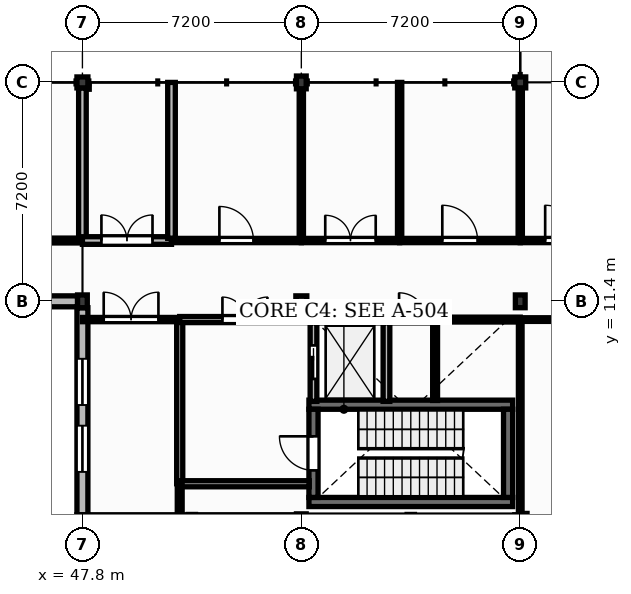
"""IFC4 building model, lengths in metres.
Left out: names, types, materials, properties, quantities, classifications, styles, units other than length and angle.
Written with IfcOpenShell. Run it as: python <this file> out.ifc"""

import sys

from ifc_helpers import new_model, si_unit, direction, frame, frame_2d, origin, origin_2d, place, context, subcontext, project, spatial, rectangle, extrude, element, fill, save


model = new_model("IFC4")
c1 = context("Model", 3, precision=1e-05, world=origin(), true_north=direction((0.0, 1.0)))
c2 = subcontext(c1, "Body", "Model", "MODEL_VIEW")
j1 = project(units=[si_unit("LENGTHUNIT", "METRE"), si_unit("PLANEANGLEUNIT", "RADIAN")], contexts=[c1])
p1 = place(None, origin())
s1 = spatial("IfcSite", under=j1, at=p1, CompositionType="ELEMENT")
p2 = place(p1, origin())
s2 = spatial("IfcBuilding", under=s1, at=p2, CompositionType="ELEMENT")
p3 = place(p2, frame((0.0, 0.0, 4.5)))
s3 = spatial("IfcBuildingStorey", under=s2, at=p3, CompositionType="ELEMENT", Elevation=4.5)
p4 = place(p3, frame((47.8, 11.4, 0.0), z_axis=(0.0, 0.0, 1.0), x_axis=(1.0, 0.0, 0.0)))
e1 = element("IfcColumn", 1, at=p4, inside=s3, PredefinedType="COLUMN", context=c2, shape_type="SweptSolid", body=[
    extrude(rectangle(XDim=0.32, YDim=0.42, at=origin_2d()), origin(), (0.0, 0.0, 1.0), 4.26),
])
p5 = place(p3, frame((47.8, 18.6, 0.0), z_axis=(0.0, 0.0, 1.0), x_axis=(1.0, 0.0, 0.0)))
e2 = element("IfcColumn", 2, at=p5, inside=s3, PredefinedType="COLUMN", context=c2, shape_type="SweptSolid", body=[
    extrude(rectangle(XDim=0.36, YDim=0.36, at=origin_2d()), origin(), (0.0, 0.0, 1.0), 4.26),
])
p6 = place(p3, frame((55.0, 4.2, 0.0), z_axis=(0.0, 0.0, 1.0), x_axis=(1.0, 0.0, 0.0)))
e3 = element("IfcColumn", 3, at=p6, inside=s3, PredefinedType="COLUMN", context=c2, shape_type="SweptSolid", body=[
    extrude(rectangle(XDim=0.32, YDim=0.42, at=origin_2d()), origin(), (0.0, 0.0, 1.0), 4.26),
])
p7 = place(p3, frame((55.0, 11.4, 0.0), z_axis=(0.0, 0.0, 1.0), x_axis=(1.0, 0.0, 0.0)))
e4 = element("IfcColumn", 4, at=p7, inside=s3, PredefinedType="COLUMN", context=c2, shape_type="SweptSolid", body=[
    extrude(rectangle(XDim=0.36, YDim=0.36, at=origin_2d()), origin(), (0.0, 0.0, 1.0), 4.26),
])
for number, where, z_axis, x_axis in (
    (5, (55.0, 18.6, 0.0), (0.0, 0.0, 1.0), (1.0, 0.0, 0.0)),
    (6, (62.2, 11.4, 0.0), (0.0, 0.0, 1.0), (1.0, 0.0, 0.0)),
):
    element("IfcColumn", number, at=place(p3, frame(where, z_axis=z_axis, x_axis=x_axis)), inside=s3, PredefinedType="COLUMN", context=c2, shape_type="SweptSolid", body=[
        extrude(rectangle(XDim=0.32, YDim=0.42, at=origin_2d()), origin(), (0.0, 0.0, 1.0), 4.26),
    ])
p8 = place(p3, frame((62.2, 18.6, 0.0), z_axis=(0.0, 0.0, 1.0), x_axis=(1.0, 0.0, 0.0)))
e7 = element("IfcColumn", 7, at=p8, inside=s3, PredefinedType="COLUMN", context=c2, shape_type="SweptSolid", body=[
    extrude(rectangle(XDim=0.36, YDim=0.36, at=origin_2d()), origin(), (0.0, 0.0, 1.0), 4.26),
])
p9 = place(p3, frame((40.78, 11.4, 0.0), z_axis=(0.0, 0.0, 1.0), x_axis=(1.0, 0.0, 0.0)))
e8 = element("IfcWall", 8, at=p9, inside=s3, PredefinedType="SOLIDWALL", context=c2, shape_type="SweptSolid", body=[
    extrude(rectangle(XDim=6.86, YDim=0.36, at=frame_2d((3.43, 0.0))), origin(), (0.0, 0.0, 1.0), 3.8),
])
p10 = place(p9, frame((1.33, 0.0, 1.0)))
e9 = element("IfcOpeningElement", 9, at=p10, cuts=e8, PredefinedType="OPENING", context=c2, shape_type="SweptSolid", body=[
    extrude(rectangle(XDim=1.76, YDim=1.95, at=frame_2d((0.88, 0.975))), frame((0.0, 0.19, 0.0), z_axis=(0.0, -1.0, 0.0), x_axis=(1.0, 0.0, 0.0)), (0.0, 0.0, 1.0), 0.38),
])
p11 = place(p9, frame((3.77, 0.0, 1.0)))
e10 = element("IfcOpeningElement", 10, at=p11, cuts=e8, PredefinedType="OPENING", context=c2, shape_type="SweptSolid", body=[
    extrude(rectangle(XDim=1.76, YDim=1.95, at=frame_2d((0.88, 0.975))), frame((0.0, 0.19, 0.0), z_axis=(0.0, -1.0, 0.0), x_axis=(1.0, 0.0, 0.0)), (0.0, 0.0, 1.0), 0.38),
])
p12 = place(p3, frame((47.8, 4.38, 0.0), z_axis=(0.0, 0.0, 1.0), x_axis=(0.0, 1.0, 0.0)))
e11 = element("IfcWall", 11, at=p12, inside=s3, PredefinedType="SOLIDWALL", context=c2, shape_type="SweptSolid", body=[
    extrude(rectangle(XDim=6.81, YDim=0.36, at=frame_2d((3.405, 0.0))), origin(), (0.0, 0.0, 1.0), 3.8),
])
p13 = place(p12, frame((1.41, 0.0, 1.0)))
e12 = element("IfcOpeningElement", 12, at=p13, cuts=e11, PredefinedType="OPENING", context=c2, shape_type="SweptSolid", body=[
    extrude(rectangle(XDim=1.52, YDim=1.8, at=frame_2d((0.76, 0.9))), frame((0.0, 0.19, 0.0), z_axis=(0.0, -1.0, 0.0), x_axis=(1.0, 0.0, 0.0)), (0.0, 0.0, 1.0), 0.38),
])
p14 = place(p12, frame((3.61, 0.0, 1.0)))
e13 = element("IfcOpeningElement", 13, at=p14, cuts=e11, PredefinedType="OPENING", context=c2, shape_type="SweptSolid", body=[
    extrude(rectangle(XDim=1.52, YDim=1.8, at=frame_2d((0.76, 0.9))), frame((0.0, 0.19, 0.0), z_axis=(0.0, -1.0, 0.0), x_axis=(1.0, 0.0, 0.0)), (0.0, 0.0, 1.0), 0.38),
])
for number, where, z_axis, x_axis in (
    (14, (55.25, 4.8, 0.0), (0.0, 0.0, 1.0), (1.0, 0.0, 0.0)),
    (15, (55.25, 8.0, 0.0), (0.0, 0.0, 1.0), (1.0, 0.0, 0.0)),
):
    element("IfcWall", number, at=place(p3, frame(where, z_axis=z_axis, x_axis=x_axis)), inside=s3, PredefinedType="SHEAR", context=c2, shape_type="SweptSolid", body=[
        extrude(rectangle(XDim=6.7, YDim=0.3, at=frame_2d((3.35, 0.0))), origin(), (0.0, 0.0, 1.0), 4.25),
    ])
p15 = place(p3, frame((55.4, 4.95, 0.0), z_axis=(0.0, 0.0, 1.0), x_axis=(0.0, 1.0, 0.0)))
e16 = element("IfcWall", 16, at=p15, inside=s3, PredefinedType="SHEAR", context=c2, shape_type="SweptSolid", body=[
    extrude(rectangle(XDim=2.9, YDim=0.3, at=frame_2d((1.45, 0.0))), origin(), (0.0, 0.0, 1.0), 4.25),
])
p16 = place(p15, frame((0.89, 0.0, 0.0)))
e17 = element("IfcOpeningElement", 17, at=p16, cuts=e16, PredefinedType="OPENING", context=c2, shape_type="SweptSolid", body=[
    extrude(rectangle(XDim=1.12, YDim=2.1, at=frame_2d((0.56, 1.05))), frame((0.0, 0.16, 0.0), z_axis=(0.0, -1.0, 0.0), x_axis=(1.0, 0.0, 0.0)), (0.0, 0.0, 1.0), 0.32),
])
p17 = place(p3, frame((61.8, 4.95, 0.0), z_axis=(0.0, 0.0, 1.0), x_axis=(0.0, 1.0, 0.0)))
e18 = element("IfcWall", 18, at=p17, inside=s3, PredefinedType="SHEAR", context=c2, shape_type="SweptSolid", body=[
    extrude(rectangle(XDim=2.9, YDim=0.3, at=frame_2d((1.45, 0.0))), origin(), (0.0, 0.0, 1.0), 4.25),
])
p18 = place(p3, frame((55.4, 10.8, 0.0), z_axis=(0.0, 0.0, 1.0), x_axis=(1.0, 0.0, 0.0)))
e19 = element("IfcWall", 19, at=p18, inside=s3, PredefinedType="SOLIDWALL", context=c2, shape_type="SweptSolid", body=[
    extrude(rectangle(XDim=2.4, YDim=0.22, at=frame_2d((1.2, 0.0))), origin(), (0.0, 0.0, 1.0), 4.25),
])
p19 = place(p3, frame((55.4, 8.11, 0.0), z_axis=(0.0, 0.0, 1.0), x_axis=(0.0, 1.0, 0.0)))
e20 = element("IfcWall", 20, at=p19, inside=s3, PredefinedType="SOLIDWALL", context=c2, shape_type="SweptSolid", body=[
    extrude(rectangle(XDim=2.58, YDim=0.22, at=frame_2d((1.29, 0.0))), origin(), (0.0, 0.0, 1.0), 4.25),
])
p20 = place(p19, frame((0.74, 0.0, 0.0)))
e21 = element("IfcOpeningElement", 21, at=p20, cuts=e20, PredefinedType="OPENING", context=c2, shape_type="SweptSolid", body=[
    extrude(rectangle(XDim=1.1, YDim=2.15, at=frame_2d((0.55, 1.075))), frame((0.0, 0.12, 0.0), z_axis=(0.0, -1.0, 0.0), x_axis=(1.0, 0.0, 0.0)), (0.0, 0.0, 1.0), 0.24),
])
p21 = place(p3, frame((57.8, 8.11, 0.0), z_axis=(0.0, 0.0, 1.0), x_axis=(0.0, 1.0, 0.0)))
e22 = element("IfcWall", 22, at=p21, inside=s3, PredefinedType="SOLIDWALL", context=c2, shape_type="SweptSolid", body=[
    extrude(rectangle(XDim=2.58, YDim=0.22, at=frame_2d((1.29, 0.0))), origin(), (0.0, 0.0, 1.0), 4.25),
])
p22 = place(p3, frame((40.6, 13.4, 0.0), z_axis=(0.0, 0.0, 1.0), x_axis=(1.0, 0.0, 0.0)))
e23 = element("IfcWall", 23, at=p22, inside=s3, PredefinedType="PARTITIONING", context=c2, shape_type="SweptSolid", body=[
    extrude(rectangle(XDim=7.2, YDim=0.16, at=frame_2d((3.6, 0.0))), origin(), (0.0, 0.0, 1.0), 4.18),
])
p23 = place(p22, frame((2.68, 0.0, 0.0)))
e24 = element("IfcOpeningElement", 24, at=p23, cuts=e23, PredefinedType="OPENING", context=c2, shape_type="SweptSolid", body=[
    extrude(rectangle(XDim=1.84, YDim=2.35, at=frame_2d((0.92, 1.175))), frame((0.0, 0.09, 0.0), z_axis=(0.0, -1.0, 0.0), x_axis=(1.0, 0.0, 0.0)), (0.0, 0.0, 1.0), 0.18),
])
p24 = place(p3, frame((47.8, 10.8, 0.0), z_axis=(0.0, 0.0, 1.0), x_axis=(1.0, 0.0, 0.0)))
e25 = element("IfcWall", 25, at=p24, inside=s3, PredefinedType="PARTITIONING", context=c2, shape_type="SweptSolid", body=[
    extrude(rectangle(XDim=3.2, YDim=0.14, at=frame_2d((1.6, 0.0))), origin(), (0.0, 0.0, 1.0), 4.18),
])
p25 = place(p24, frame((0.7, 0.0, 0.0)))
e26 = element("IfcOpeningElement", 26, at=p25, cuts=e25, PredefinedType="OPENING", context=c2, shape_type="SweptSolid", body=[
    extrude(rectangle(XDim=1.8, YDim=2.3, at=frame_2d((0.9, 1.15))), frame((0.0, 0.08, 0.0), z_axis=(0.0, -1.0, 0.0), x_axis=(1.0, 0.0, 0.0)), (0.0, 0.0, 1.0), 0.16),
])
p26 = place(p3, frame((47.8, 13.47, 0.0), z_axis=(0.0, 0.0, 1.0), x_axis=(0.0, 1.0, 0.0)))
e27 = element("IfcWall", 27, at=p26, inside=s3, PredefinedType="SOLIDWALL", context=c2, shape_type="SweptSolid", body=[
    extrude(rectangle(XDim=4.95, YDim=0.25, at=frame_2d((2.475, 0.0))), origin(), (0.0, 0.0, 1.0), 3.74),
])
p27 = place(p3, frame((47.8, 13.4, 0.0), z_axis=(0.0, 0.0, 1.0), x_axis=(1.0, 0.0, 0.0)))
e28 = element("IfcWall", 28, at=p27, inside=s3, PredefinedType="SOLIDWALL", context=c2, shape_type="SweptSolid", body=[
    extrude(rectangle(XDim=2.93, YDim=0.25, at=frame_2d((1.465, 0.0))), origin(), (0.0, 0.0, 1.0), 4.18),
])
p28 = place(p27, frame((0.625, 0.0, 0.0)))
e29 = element("IfcOpeningElement", 29, at=p28, cuts=e28, PredefinedType="OPENING", context=c2, shape_type="SweptSolid", body=[
    extrude(rectangle(XDim=1.68, YDim=2.3, at=frame_2d((0.84, 1.15))), frame((0.0, 0.135, 0.0), z_axis=(0.0, -1.0, 0.0), x_axis=(1.0, 0.0, 0.0)), (0.0, 0.0, 1.0), 0.27),
])
p29 = place(p3, frame((50.73, 13.47, 0.0), z_axis=(0.0, 0.0, 1.0), x_axis=(0.0, 1.0, 0.0)))
e30 = element("IfcWall", 30, at=p29, inside=s3, PredefinedType="SOLIDWALL", context=c2, shape_type="SweptSolid", body=[
    extrude(rectangle(XDim=5.13, YDim=0.25, at=frame_2d((2.565, 0.0))), origin(), (0.0, 0.0, 1.0), 4.18),
])
p30 = place(p3, frame((50.73, 13.4, 0.0), z_axis=(0.0, 0.0, 1.0), x_axis=(1.0, 0.0, 0.0)))
e31 = element("IfcWall", 31, at=p30, inside=s3, PredefinedType="PARTITIONING", context=c2, shape_type="SweptSolid", body=[
    extrude(rectangle(XDim=4.27, YDim=0.14, at=frame_2d((2.135, 0.0))), origin(), (0.0, 0.0, 1.0), 4.18),
])
p31 = place(p30, frame((1.575, 0.0, 0.0)))
e32 = element("IfcOpeningElement", 32, at=p31, cuts=e31, PredefinedType="OPENING", context=c2, shape_type="SweptSolid", body=[
    extrude(rectangle(XDim=1.12, YDim=2.15, at=frame_2d((0.56, 1.075))), frame((0.0, 0.08, 0.0), z_axis=(0.0, -1.0, 0.0), x_axis=(1.0, 0.0, 0.0)), (0.0, 0.0, 1.0), 0.16),
])
p32 = place(p3, frame((51.0, 5.4, 0.0), z_axis=(0.0, 0.0, 1.0), x_axis=(0.0, 1.0, 0.0)))
e33 = element("IfcWall", 33, at=p32, inside=s3, PredefinedType="PARTITIONING", context=c2, shape_type="SweptSolid", body=[
    extrude(rectangle(XDim=5.33, YDim=0.2, at=frame_2d((2.665, 0.0))), origin(), (0.0, 0.0, 1.0), 4.18),
])
p33 = place(p3, frame((51.0, 10.8, 0.0), z_axis=(0.0, 0.0, 1.0), x_axis=(1.0, 0.0, 0.0)))
e34 = element("IfcWall", 34, at=p33, inside=s3, PredefinedType="PARTITIONING", context=c2, shape_type="SweptSolid", body=[
    extrude(rectangle(XDim=4.29, YDim=0.2, at=frame_2d((2.145, 0.0))), origin(), (0.0, 0.0, 1.0), 4.18),
])
p34 = place(p33, frame((1.405, 0.0, 0.0)))
e35 = element("IfcOpeningElement", 35, at=p34, cuts=e34, PredefinedType="OPENING", context=c2, shape_type="SweptSolid", body=[
    extrude(rectangle(XDim=1.48, YDim=2.25, at=frame_2d((0.74, 1.125))), frame((0.0, 0.11, 0.0), z_axis=(0.0, -1.0, 0.0), x_axis=(1.0, 0.0, 0.0)), (0.0, 0.0, 1.0), 0.22),
])
p35 = place(p3, frame((55.0, 13.47, 0.0), z_axis=(0.0, 0.0, 1.0), x_axis=(0.0, 1.0, 0.0)))
e36 = element("IfcWall", 36, at=p35, inside=s3, PredefinedType="PARTITIONING", context=c2, shape_type="SweptSolid", body=[
    extrude(rectangle(XDim=4.92, YDim=0.14, at=frame_2d((2.46, 0.0))), origin(), (0.0, 0.0, 1.0), 3.74),
])
p36 = place(p3, frame((55.0, 13.4, 0.0), z_axis=(0.0, 0.0, 1.0), x_axis=(1.0, 0.0, 0.0)))
e37 = element("IfcWall", 37, at=p36, inside=s3, PredefinedType="PARTITIONING", context=c2, shape_type="SweptSolid", body=[
    extrude(rectangle(XDim=3.233, YDim=0.14, at=frame_2d((1.616, 0.0))), origin(), (0.0, 0.0, 1.0), 4.18),
])
p37 = place(p36, frame((0.787, 0.0, 0.0)))
e38 = element("IfcOpeningElement", 38, at=p37, cuts=e37, PredefinedType="OPENING", context=c2, shape_type="SweptSolid", body=[
    extrude(rectangle(XDim=1.66, YDim=2.3, at=frame_2d((0.83, 1.15))), frame((0.0, 0.08, 0.0), z_axis=(0.0, -1.0, 0.0), x_axis=(1.0, 0.0, 0.0)), (0.0, 0.0, 1.0), 0.16),
])
p38 = place(p3, frame((57.91, 10.8, 0.0), z_axis=(0.0, 0.0, 1.0), x_axis=(1.0, 0.0, 0.0)))
e39 = element("IfcWall", 39, at=p38, inside=s3, PredefinedType="SOLIDWALL", context=c2, shape_type="SweptSolid", body=[
    extrude(rectangle(XDim=1.49, YDim=0.22, at=frame_2d((0.745, 0.0))), origin(), (0.0, 0.0, 1.0), 4.18),
])
p39 = place(p38, frame((0.305, 0.0, 0.0)))
e40 = element("IfcOpeningElement", 40, at=p39, cuts=e39, PredefinedType="OPENING", context=c2, shape_type="SweptSolid", body=[
    extrude(rectangle(XDim=0.88, YDim=2.05, at=frame_2d((0.44, 1.025))), frame((0.0, 0.12, 0.0), z_axis=(0.0, -1.0, 0.0), x_axis=(1.0, 0.0, 0.0)), (0.0, 0.0, 1.0), 0.24),
])
p40 = place(p3, frame((58.233, 13.47, 0.0), z_axis=(0.0, 0.0, 1.0), x_axis=(0.0, 1.0, 0.0)))
e41 = element("IfcWall", 41, at=p40, inside=s3, PredefinedType="PARTITIONING", context=c2, shape_type="SweptSolid", body=[
    extrude(rectangle(XDim=5.13, YDim=0.14, at=frame_2d((2.565, 0.0))), origin(), (0.0, 0.0, 1.0), 4.18),
])
p41 = place(p3, frame((58.233, 13.4, 0.0), z_axis=(0.0, 0.0, 1.0), x_axis=(1.0, 0.0, 0.0)))
e42 = element("IfcWall", 42, at=p41, inside=s3, PredefinedType="PARTITIONING", context=c2, shape_type="SweptSolid", body=[
    extrude(rectangle(XDim=3.967, YDim=0.14, at=frame_2d((1.983, 0.0))), origin(), (0.0, 0.0, 1.0), 4.18),
])
p42 = place(p41, frame((1.404, 0.0, 0.0)))
e43 = element("IfcOpeningElement", 43, at=p42, cuts=e42, PredefinedType="OPENING", context=c2, shape_type="SweptSolid", body=[
    extrude(rectangle(XDim=1.16, YDim=2.1, at=frame_2d((0.58, 1.05))), frame((0.0, 0.08, 0.0), z_axis=(0.0, -1.0, 0.0), x_axis=(1.0, 0.0, 0.0)), (0.0, 0.0, 1.0), 0.16),
])
p43 = place(p3, frame((62.2, 10.8, 0.0), z_axis=(0.0, 0.0, 1.0), x_axis=(1.0, 0.0, 0.0)))
e44 = element("IfcWall", 44, at=p43, inside=s3, PredefinedType="PLUMBINGWALL", context=c2, shape_type="SweptSolid", body=[
    extrude(rectangle(XDim=3.6, YDim=0.12, at=frame_2d((1.8, 0.0))), origin(), (0.0, 0.0, 1.0), 4.18),
])
p44 = place(p43, frame((1.325, 0.0, 0.0)))
e45 = element("IfcOpeningElement", 45, at=p44, cuts=e44, PredefinedType="OPENING", context=c2, shape_type="SweptSolid", body=[
    extrude(rectangle(XDim=0.95, YDim=2.1, at=frame_2d((0.475, 1.05))), frame((0.0, 0.07, 0.0), z_axis=(0.0, -1.0, 0.0), x_axis=(1.0, 0.0, 0.0)), (0.0, 0.0, 1.0), 0.14),
])
p45 = place(p3, frame((62.2, 13.47, 0.0), z_axis=(0.0, 0.0, 1.0), x_axis=(0.0, 1.0, 0.0)))
e46 = element("IfcWall", 46, at=p45, inside=s3, PredefinedType="PARTITIONING", context=c2, shape_type="SweptSolid", body=[
    extrude(rectangle(XDim=4.95, YDim=0.14, at=frame_2d((2.475, 0.0))), origin(), (0.0, 0.0, 1.0), 3.74),
])
p46 = place(p3, frame((62.2, 13.4, 0.0), z_axis=(0.0, 0.0, 1.0), x_axis=(1.0, 0.0, 0.0)))
e47 = element("IfcWall", 47, at=p46, inside=s3, PredefinedType="PARTITIONING", context=c2, shape_type="SweptSolid", body=[
    extrude(rectangle(XDim=2.8, YDim=0.14, at=frame_2d((1.4, 0.0))), origin(), (0.0, 0.0, 1.0), 4.18),
])
p47 = place(p46, frame((0.82, 0.0, 0.0)))
e48 = element("IfcOpeningElement", 48, at=p47, cuts=e47, PredefinedType="OPENING", context=c2, shape_type="SweptSolid", body=[
    extrude(rectangle(XDim=1.16, YDim=2.1, at=frame_2d((0.58, 1.05))), frame((0.0, 0.08, 0.0), z_axis=(0.0, -1.0, 0.0), x_axis=(1.0, 0.0, 0.0)), (0.0, 0.0, 1.0), 0.16),
])
p48 = place(p3, frame((59.4, 8.14, 0.0), z_axis=(0.0, 0.0, 1.0), x_axis=(0.0, 1.0, 0.0)))
e49 = element("IfcWall", 49, at=p48, inside=s3, PredefinedType="PARTITIONING", context=c2, shape_type="SweptSolid", body=[
    extrude(rectangle(XDim=2.59, YDim=0.16, at=frame_2d((1.295, 0.0))), origin(), (0.0, 0.0, 1.0), 4.18),
])
p49 = place(p3, frame((51.0, 5.4, 0.0), z_axis=(0.0, 0.0, 1.0), x_axis=(1.0, 0.0, 0.0)))
e50 = element("IfcWall", 50, at=p49, inside=s3, PredefinedType="PARTITIONING", context=c2, shape_type="SweptSolid", body=[
    extrude(rectangle(XDim=4.26, YDim=0.2, at=frame_2d((2.13, 0.0))), origin(), (0.0, 0.0, 1.0), 4.18),
])
p50 = place(p3, frame((59.4, 10.8, 0.0), z_axis=(0.0, 0.0, 1.0), x_axis=(1.0, 0.0, 0.0)))
e51 = element("IfcWall", 51, at=p50, inside=s3, PredefinedType="PARTITIONING", context=c2, shape_type="SweptSolid", body=[
    extrude(rectangle(XDim=2.8, YDim=0.16, at=frame_2d((1.4, 0.0))), origin(), (0.0, 0.0, 1.0), 4.18),
])
p51 = place(p3, frame((62.2, 4.38, 0.0), z_axis=(0.0, 0.0, 1.0), x_axis=(0.0, 1.0, 0.0)))
e52 = element("IfcWall", 52, at=p51, inside=s3, PredefinedType="PLUMBINGWALL", context=c2, shape_type="SweptSolid", body=[
    extrude(rectangle(XDim=6.35, YDim=0.12, at=frame_2d((3.175, 0.0))), origin(), (0.0, 0.0, 1.0), 3.74),
])
p52 = place(p3, frame((51.0, 4.2, 0.0), z_axis=(0.0, 0.0, 1.0), x_axis=(0.0, 1.0, 0.0)))
e53 = element("IfcWall", 53, at=p52, inside=s3, PredefinedType="PARTITIONING", context=c2, shape_type="SweptSolid", body=[
    extrude(rectangle(XDim=1.2, YDim=0.16, at=frame_2d((0.6, 0.0))), origin(), (0.0, 0.0, 1.0), 4.18),
])
p53 = place(p13, origin())
e54 = element("IfcWindow", 54, at=p53, inside=s3, PartitioningType="DOUBLE_PANEL_VERTICAL", PredefinedType="WINDOW", context=c2, shape_type="SweptSolid", body=[
    extrude(rectangle(XDim=1.52, YDim=1.8, at=frame_2d((0.76, 0.9))), frame((0.0, 0.03, 0.0), z_axis=(0.0, -1.0, 0.0), x_axis=(1.0, 0.0, 0.0)), (0.0, 0.0, 1.0), 0.06),
])
fill(e12, e54)
p54 = place(p14, origin())
e55 = element("IfcWindow", 55, at=p54, inside=s3, PartitioningType="DOUBLE_PANEL_VERTICAL", PredefinedType="WINDOW", context=c2, shape_type="SweptSolid", body=[
    extrude(rectangle(XDim=1.52, YDim=1.8, at=frame_2d((0.76, 0.9))), frame((0.0, 0.03, 0.0), z_axis=(0.0, -1.0, 0.0), x_axis=(1.0, 0.0, 0.0)), (0.0, 0.0, 1.0), 0.06),
])
fill(e13, e55)
p55 = place(p20, origin())
e56 = element("IfcDoor", 56, at=p55, inside=s3, OperationType="SLIDING_TO_LEFT", PredefinedType="DOOR", context=c2, shape_type="SweptSolid", body=[
    extrude(rectangle(XDim=1.1, YDim=2.15, at=frame_2d((0.55, 1.075))), frame((0.0, 0.025, 0.0), z_axis=(0.0, -1.0, 0.0), x_axis=(1.0, 0.0, 0.0)), (0.0, 0.0, 1.0), 0.05),
])
fill(e21, e56)
p56 = place(p16, origin())
e57 = element("IfcDoor", 57, at=p56, inside=s3, OperationType="SINGLE_SWING_RIGHT", PredefinedType="DOOR", context=c2, shape_type="SweptSolid", body=[
    extrude(rectangle(XDim=1.12, YDim=2.1, at=frame_2d((0.56, 1.05))), frame((0.0, 0.025, 0.0), z_axis=(0.0, -1.0, 0.0), x_axis=(1.0, 0.0, 0.0)), (0.0, 0.0, 1.0), 0.05),
])
fill(e17, e57)
p57 = place(p34, origin())
e58 = element("IfcDoor", 58, at=p57, inside=s3, OperationType="DOUBLE_DOOR_SINGLE_SWING", PredefinedType="DOOR", context=c2, shape_type="SweptSolid", body=[
    extrude(rectangle(XDim=1.48, YDim=2.25, at=frame_2d((0.74, 1.125))), frame((0.0, 0.025, 0.0), z_axis=(0.0, -1.0, 0.0), x_axis=(1.0, 0.0, 0.0)), (0.0, 0.0, 1.0), 0.05),
])
fill(e35, e58)
p58 = place(p47, origin())
e59 = element("IfcDoor", 59, at=p58, inside=s3, OperationType="SINGLE_SWING_LEFT", PredefinedType="DOOR", context=c2, shape_type="SweptSolid", body=[
    extrude(rectangle(XDim=1.16, YDim=2.1, at=frame_2d((0.58, 1.05))), frame((0.0, 0.025, 0.0), z_axis=(0.0, -1.0, 0.0), x_axis=(1.0, 0.0, 0.0)), (0.0, 0.0, 1.0), 0.05),
])
fill(e48, e59)
p59 = place(p39, origin())
e60 = element("IfcDoor", 60, at=p59, inside=s3, OperationType="SINGLE_SWING_LEFT", PredefinedType="DOOR", context=c2, shape_type="SweptSolid", body=[
    extrude(rectangle(XDim=0.88, YDim=2.05, at=frame_2d((0.44, 1.025))), frame((0.0, 0.025, 0.0), z_axis=(0.0, -1.0, 0.0), x_axis=(1.0, 0.0, 0.0)), (0.0, 0.0, 1.0), 0.05),
])
fill(e40, e60)
p60 = place(p25, origin())
e61 = element("IfcDoor", 61, at=p60, inside=s3, OperationType="DOUBLE_DOOR_SINGLE_SWING", PredefinedType="DOOR", context=c2, shape_type="SweptSolid", body=[
    extrude(rectangle(XDim=1.8, YDim=2.3, at=frame_2d((0.9, 1.15))), frame((0.0, 0.025, 0.0), z_axis=(0.0, -1.0, 0.0), x_axis=(1.0, 0.0, 0.0)), (0.0, 0.0, 1.0), 0.05),
])
fill(e26, e61)
p61 = place(p28, origin())
e62 = element("IfcDoor", 62, at=p61, inside=s3, OperationType="DOUBLE_DOOR_SINGLE_SWING", PredefinedType="DOOR", context=c2, shape_type="SweptSolid", body=[
    extrude(rectangle(XDim=1.68, YDim=2.3, at=frame_2d((0.84, 1.15))), frame((0.0, 0.025, 0.0), z_axis=(0.0, -1.0, 0.0), x_axis=(1.0, 0.0, 0.0)), (0.0, 0.0, 1.0), 0.05),
])
fill(e29, e62)
p62 = place(p31, origin())
e63 = element("IfcDoor", 63, at=p62, inside=s3, OperationType="SINGLE_SWING_LEFT", PredefinedType="DOOR", context=c2, shape_type="SweptSolid", body=[
    extrude(rectangle(XDim=1.12, YDim=2.15, at=frame_2d((0.56, 1.075))), frame((0.0, 0.025, 0.0), z_axis=(0.0, -1.0, 0.0), x_axis=(1.0, 0.0, 0.0)), (0.0, 0.0, 1.0), 0.05),
])
fill(e32, e63)
p63 = place(p37, origin())
e64 = element("IfcDoor", 64, at=p63, inside=s3, OperationType="DOUBLE_DOOR_SINGLE_SWING", PredefinedType="DOOR", context=c2, shape_type="SweptSolid", body=[
    extrude(rectangle(XDim=1.66, YDim=2.3, at=frame_2d((0.83, 1.15))), frame((0.0, 0.025, 0.0), z_axis=(0.0, -1.0, 0.0), x_axis=(1.0, 0.0, 0.0)), (0.0, 0.0, 1.0), 0.05),
])
fill(e38, e64)
p64 = place(p42, origin())
e65 = element("IfcDoor", 65, at=p64, inside=s3, OperationType="SINGLE_SWING_LEFT", PredefinedType="DOOR", context=c2, shape_type="SweptSolid", body=[
    extrude(rectangle(XDim=1.16, YDim=2.1, at=frame_2d((0.58, 1.05))), frame((0.0, 0.025, 0.0), z_axis=(0.0, -1.0, 0.0), x_axis=(1.0, 0.0, 0.0)), (0.0, 0.0, 1.0), 0.05),
])
fill(e43, e65)
save(model, sys.argv[1])
